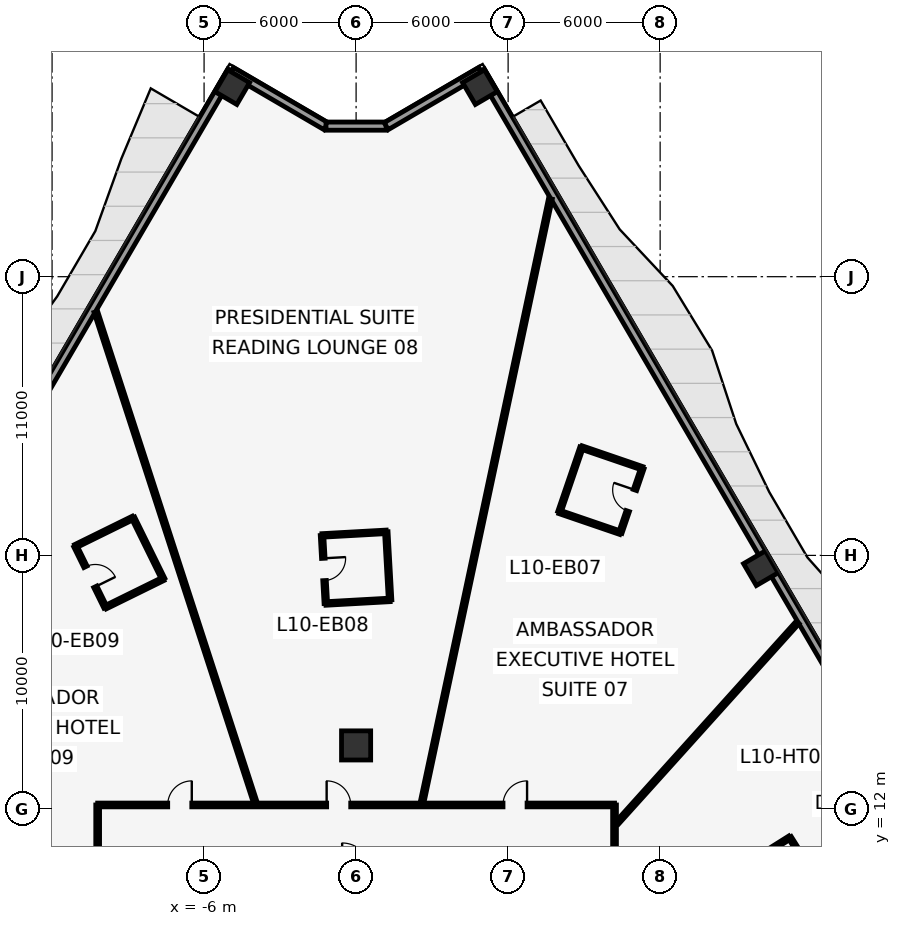
"""IFC4 building model, lengths in metres.
Left out: names, types, materials, properties, quantities, classifications, styles, units other than length and angle.
Written with IfcOpenShell. Run it as: python <this file> out.ifc"""

import sys

from ifc_helpers import new_model, si_unit, direction, frame, frame_2d, origin, origin_2d, place, context, subcontext, project, spatial, rectangle, hollow_rectangle, extrude, element, fill, save


model = new_model("IFC4")
c1 = context("Model", 3, precision=1e-05, world=origin(), true_north=direction((0.0, 1.0)))
c2 = subcontext(c1, "Body", "Model", "MODEL_VIEW")
j1 = project(units=[si_unit("LENGTHUNIT", "METRE"), si_unit("PLANEANGLEUNIT", "RADIAN")], contexts=[c1])
p1 = place(None, origin())
s1 = spatial("IfcSite", under=j1, at=p1, CompositionType="ELEMENT")
p2 = place(p1, origin())
s2 = spatial("IfcBuilding", under=s1, at=p2, CompositionType="ELEMENT")
p3 = place(p2, frame((0.0, 0.0, 50.4)))
s3 = spatial("IfcBuildingStorey", under=s2, at=p3, CompositionType="ELEMENT", Elevation=50.4)
p4 = place(p3, frame((0.0, 14.5, 0.0), z_axis=(0.0, 0.0, 1.0), x_axis=(1.0, 0.0, 0.0)))
e1 = element("IfcColumn", 1, at=p4, inside=s3, PredefinedType="COLUMN", context=c2, shape_type="SweptSolid", body=[
    extrude(rectangle(XDim=1.15, YDim=1.15, at=origin_2d()), origin(), (0.0, 0.0, 1.0), 4.0),
])
for number, where, z_axis, x_axis in (
    (2, (-4.887, 40.481, 0.0), (0.0, 0.0, 1.0), (0.504, 0.863, 0.0)),
    (3, (15.976, 21.494, 0.0), (0.0, 0.0, 1.0), (-0.504, 0.863, 0.0)),
    (4, (4.887, 40.481, 0.0), (0.0, 0.0, 1.0), (-0.504, 0.863, 0.0)),
):
    element("IfcColumn", number, at=place(p3, frame(where, z_axis=z_axis, x_axis=x_axis)), inside=s3, PredefinedType="COLUMN", context=c2, shape_type="SweptSolid", body=[
        extrude(hollow_rectangle(XDim=1.0, YDim=1.0, WallThickness=0.06, at=origin_2d()), origin(), (0.0, 0.0, 1.0), 4.0),
    ])
p5 = place(p3, frame((4.923, 41.122, 0.0), z_axis=(0.0, 0.0, 1.0), x_axis=(0.504213113214, -0.863579258935, 0.0)))
e5 = element("IfcWall", 5, at=p5, inside=s3, PredefinedType="STANDARD", context=c2, shape_type="SweptSolid", body=[
    extrude(rectangle(XDim=67.041, YDim=0.32, at=frame_2d((33.521, 0.0))), origin(), (0.0, 0.0, 1.0), 3.75),
])
p6 = place(p5, frame((33.021, 0.0, 0.0)))
e6 = element("IfcOpeningElement", 6, at=p6, cuts=e5, PredefinedType="OPENING", context=c2, shape_type="SweptSolid", body=[
    extrude(rectangle(XDim=1.0, YDim=2.15, at=frame_2d((0.5, 1.075))), frame((0.0, 0.17, 0.0), z_axis=(0.0, -1.0, 0.0), x_axis=(1.0, 0.0, 0.0)), (0.0, 0.0, 1.0), 0.34),
])
p7 = place(p3, frame((-38.726, -16.773, 0.0), z_axis=(0.0, 0.0, 1.0), x_axis=(0.504213113214, 0.863579258935, 0.0)))
e7 = element("IfcWall", 7, at=p7, inside=s3, PredefinedType="STANDARD", context=c2, shape_type="SweptSolid", body=[
    extrude(rectangle(XDim=67.041, YDim=0.32, at=frame_2d((33.521, 0.0))), origin(), (0.0, 0.0, 1.0), 3.75),
])
p8 = place(p7, frame((33.021, 0.0, 0.0)))
e8 = element("IfcOpeningElement", 8, at=p8, cuts=e7, PredefinedType="OPENING", context=c2, shape_type="SweptSolid", body=[
    extrude(rectangle(XDim=1.0, YDim=2.15, at=frame_2d((0.5, 1.075))), frame((0.0, 0.17, 0.0), z_axis=(0.0, -1.0, 0.0), x_axis=(1.0, 0.0, 0.0)), (0.0, 0.0, 1.0), 0.34),
])
p9 = place(p3, frame((-4.923, 41.122, 0.0), z_axis=(0.0, 0.0, 1.0), x_axis=(0.863588414101, -0.50419743259, 0.0)))
e9 = element("IfcWall", 9, at=p9, inside=s3, PredefinedType="STANDARD", context=c2, shape_type="SweptSolid", body=[
    extrude(rectangle(XDim=4.324, YDim=0.32, at=frame_2d((2.162, 0.0))), origin(), (0.0, 0.0, 1.0), 3.75),
])
p10 = place(p3, frame((-1.188, 38.941, 0.0), z_axis=(0.0, 0.0, 1.0), x_axis=(1.0, 0.0, 0.0)))
e10 = element("IfcWall", 10, at=p10, inside=s3, PredefinedType="STANDARD", context=c2, shape_type="SweptSolid", body=[
    extrude(rectangle(XDim=2.376, YDim=0.32, at=frame_2d((1.188, 0.0))), origin(), (0.0, 0.0, 1.0), 3.75),
])
p11 = place(p3, frame((1.188, 38.941, 0.0), z_axis=(0.0, 0.0, 1.0), x_axis=(0.863588414101, 0.50419743259, 0.0)))
e11 = element("IfcWall", 11, at=p11, inside=s3, PredefinedType="STANDARD", context=c2, shape_type="SweptSolid", body=[
    extrude(rectangle(XDim=4.324, YDim=0.32, at=frame_2d((2.162, 0.0))), origin(), (0.0, 0.0, 1.0), 3.75),
])
p12 = place(p3, frame((-10.2, 12.15, 0.0), z_axis=(0.0, 0.0, 1.0), x_axis=(1.0, 0.0, 0.0)))
e12 = element("IfcWall", 12, at=p12, inside=s3, PredefinedType="PARTITIONING", context=c2, shape_type="SweptSolid", body=[
    extrude(rectangle(XDim=20.4, YDim=0.15, at=frame_2d((10.2, 0.0))), origin(), (0.0, 0.0, 1.0), 3.75),
])
p13 = place(p12, frame((15.998, 0.0, 0.0)))
e13 = element("IfcOpeningElement", 13, at=p13, cuts=e12, PredefinedType="OPENING", context=c2, shape_type="SweptSolid", body=[
    extrude(rectangle(XDim=0.95, YDim=2.15, at=frame_2d((0.475, 1.075))), frame((0.0, 0.085, 0.0), z_axis=(0.0, -1.0, 0.0), x_axis=(1.0, 0.0, 0.0)), (0.0, 0.0, 1.0), 0.17),
])
p14 = place(p12, frame((9.038, 0.0, 0.0)))
e14 = element("IfcOpeningElement", 14, at=p14, cuts=e12, PredefinedType="OPENING", context=c2, shape_type="SweptSolid", body=[
    extrude(rectangle(XDim=0.95, YDim=2.15, at=frame_2d((0.475, 1.075))), frame((0.0, 0.085, 0.0), z_axis=(0.0, -1.0, 0.0), x_axis=(1.0, 0.0, 0.0)), (0.0, 0.0, 1.0), 0.17),
])
p15 = place(p12, frame((2.764, 0.0, 0.0)))
e15 = element("IfcOpeningElement", 15, at=p15, cuts=e12, PredefinedType="OPENING", context=c2, shape_type="SweptSolid", body=[
    extrude(rectangle(XDim=0.95, YDim=2.15, at=frame_2d((0.475, 1.075))), frame((0.0, 0.085, 0.0), z_axis=(0.0, -1.0, 0.0), x_axis=(1.0, 0.0, 0.0)), (0.0, 0.0, 1.0), 0.17),
])
p16 = place(p3, frame((10.2, 12.15, 0.0), z_axis=(0.0, 0.0, 1.0), x_axis=(0.0, -1.0, 0.0)))
e16 = element("IfcWall", 16, at=p16, inside=s3, PredefinedType="PARTITIONING", context=c2, shape_type="SweptSolid", body=[
    extrude(rectangle(XDim=24.0, YDim=0.15, at=frame_2d((12.0, 0.0))), origin(), (0.0, 0.0, 1.0), 3.75),
])
p17 = place(p16, frame((18.691, 0.0, 0.0)))
e17 = element("IfcOpeningElement", 17, at=p17, cuts=e16, PredefinedType="OPENING", context=c2, shape_type="SweptSolid", body=[
    extrude(rectangle(XDim=0.95, YDim=2.15, at=frame_2d((0.475, 1.075))), frame((0.0, 0.085, 0.0), z_axis=(0.0, -1.0, 0.0), x_axis=(1.0, 0.0, 0.0)), (0.0, 0.0, 1.0), 0.17),
])
p18 = place(p16, frame((11.086, 0.0, 0.0)))
e18 = element("IfcOpeningElement", 18, at=p18, cuts=e16, PredefinedType="OPENING", context=c2, shape_type="SweptSolid", body=[
    extrude(rectangle(XDim=0.95, YDim=2.15, at=frame_2d((0.475, 1.075))), frame((0.0, 0.085, 0.0), z_axis=(0.0, -1.0, 0.0), x_axis=(1.0, 0.0, 0.0)), (0.0, 0.0, 1.0), 0.17),
])
p19 = place(p16, frame((4.068, 0.0, 0.0)))
e19 = element("IfcOpeningElement", 19, at=p19, cuts=e16, PredefinedType="OPENING", context=c2, shape_type="SweptSolid", body=[
    extrude(rectangle(XDim=0.95, YDim=2.15, at=frame_2d((0.475, 1.075))), frame((0.0, 0.085, 0.0), z_axis=(0.0, -1.0, 0.0), x_axis=(1.0, 0.0, 0.0)), (0.0, 0.0, 1.0), 0.17),
])
p20 = place(p3, frame((-10.2, -11.85, 0.0), z_axis=(0.0, 0.0, 1.0), x_axis=(0.0, 1.0, 0.0)))
e20 = element("IfcWall", 20, at=p20, inside=s3, PredefinedType="PARTITIONING", context=c2, shape_type="SweptSolid", body=[
    extrude(rectangle(XDim=24.0, YDim=0.15, at=frame_2d((12.0, 0.0))), origin(), (0.0, 0.0, 1.0), 3.75),
])
p21 = place(p20, frame((8.765, 0.0, 0.0)))
e21 = element("IfcOpeningElement", 21, at=p21, cuts=e20, PredefinedType="OPENING", context=c2, shape_type="SweptSolid", body=[
    extrude(rectangle(XDim=0.95, YDim=2.15, at=frame_2d((0.475, 1.075))), frame((0.0, 0.085, 0.0), z_axis=(0.0, -1.0, 0.0), x_axis=(1.0, 0.0, 0.0)), (0.0, 0.0, 1.0), 0.17),
])
p22 = place(p20, frame((2.604, 0.0, 0.0)))
e22 = element("IfcOpeningElement", 22, at=p22, cuts=e20, PredefinedType="OPENING", context=c2, shape_type="SweptSolid", body=[
    extrude(rectangle(XDim=0.95, YDim=2.15, at=frame_2d((0.475, 1.075))), frame((0.0, 0.085, 0.0), z_axis=(0.0, -1.0, 0.0), x_axis=(1.0, 0.0, 0.0)), (0.0, 0.0, 1.0), 0.17),
])
p23 = place(p20, frame((15.759, 0.0, 0.0)))
e23 = element("IfcOpeningElement", 23, at=p23, cuts=e20, PredefinedType="OPENING", context=c2, shape_type="SweptSolid", body=[
    extrude(rectangle(XDim=0.95, YDim=2.15, at=frame_2d((0.475, 1.075))), frame((0.0, 0.085, 0.0), z_axis=(0.0, -1.0, 0.0), x_axis=(1.0, 0.0, 0.0)), (0.0, 0.0, 1.0), 0.17),
])
p24 = place(p3, frame((10.305, 11.445, 0.0), z_axis=(0.0, 0.0, 1.0), x_axis=(0.6691357603, 0.743140184815, 0.0)))
e24 = element("IfcWall", 24, at=p24, inside=s3, PredefinedType="PARTITIONING", context=c2, shape_type="SweptSolid", body=[
    extrude(rectangle(XDim=10.646, YDim=0.15, at=frame_2d((5.323, 0.0))), origin(), (0.0, 0.0, 1.0), 3.75),
])
p25 = place(p3, frame((2.605, 12.255, 0.0), z_axis=(0.0, 0.0, 1.0), x_axis=(0.207909477675, 0.978148071149, 0.0)))
e25 = element("IfcWall", 25, at=p25, inside=s3, PredefinedType="PARTITIONING", context=c2, shape_type="SweptSolid", body=[
    extrude(rectangle(XDim=24.351, YDim=0.15, at=frame_2d((12.175, 0.0))), origin(), (0.0, 0.0, 1.0), 3.75),
])
p26 = place(p3, frame((-3.982, 12.255, 0.0), z_axis=(0.0, 0.0, 1.0), x_axis=(-0.309011216684, 0.951058393561, 0.0)))
e26 = element("IfcWall", 26, at=p26, inside=s3, PredefinedType="PARTITIONING", context=c2, shape_type="SweptSolid", body=[
    extrude(rectangle(XDim=20.354, YDim=0.15, at=frame_2d((10.177, 0.0))), origin(), (0.0, 0.0, 1.0), 3.75),
])
p27 = place(p3, frame((-10.305, 8.051, 0.0), z_axis=(0.0, 0.0, 1.0), x_axis=(-0.788008281042, 0.615664640051, 0.0)))
e27 = element("IfcWall", 27, at=p27, inside=s3, PredefinedType="PARTITIONING", context=c2, shape_type="SweptSolid", body=[
    extrude(rectangle(XDim=11.96, YDim=0.15, at=frame_2d((5.98, 0.0))), origin(), (0.0, 0.0, 1.0), 3.75),
])
p28 = place(p3, frame((18.469, 8.717, 0.0), z_axis=(0.0, 0.0, 1.0), x_axis=(-0.53290759563, 0.846173442339, 0.0)))
e28 = element("IfcWall", 28, at=p28, inside=s3, PredefinedType="PARTITIONING", context=c2, shape_type="SweptSolid", body=[
    extrude(rectangle(XDim=2.54, YDim=0.14, at=frame_2d((1.27, 0.0))), origin(), (0.0, 0.0, 1.0), 3.75),
])
p29 = place(p3, frame((17.115, 10.866, 0.0), z_axis=(0.0, 0.0, 1.0), x_axis=(-0.846193429407, -0.532875857991, 0.0)))
e29 = element("IfcWall", 29, at=p29, inside=s3, PredefinedType="PARTITIONING", context=c2, shape_type="SweptSolid", body=[
    extrude(rectangle(XDim=2.69, YDim=0.14, at=frame_2d((1.345, 0.0))), origin(), (0.0, 0.0, 1.0), 3.75),
])
p30 = place(p29, frame((0.905, 0.0, 0.0)))
e30 = element("IfcOpeningElement", 30, at=p30, cuts=e29, PredefinedType="OPENING", context=c2, shape_type="SweptSolid", body=[
    extrude(rectangle(XDim=0.88, YDim=2.1, at=frame_2d((0.44, 1.05))), frame((0.0, 0.08, 0.0), z_axis=(0.0, -1.0, 0.0), x_axis=(1.0, 0.0, 0.0)), (0.0, 0.0, 1.0), 0.16),
])
p31 = place(p3, frame((10.428, 22.893, 0.0), z_axis=(0.0, 0.0, 1.0), x_axis=(0.323922868878, 0.946083492625, 0.0)))
e31 = element("IfcWall", 31, at=p31, inside=s3, PredefinedType="PARTITIONING", context=c2, shape_type="SweptSolid", body=[
    extrude(rectangle(XDim=2.69, YDim=0.14, at=frame_2d((1.345, 0.0))), origin(), (0.0, 0.0, 1.0), 3.75),
])
p32 = place(p31, frame((0.905, 0.0, 0.0)))
e32 = element("IfcOpeningElement", 32, at=p32, cuts=e31, PredefinedType="OPENING", context=c2, shape_type="SweptSolid", body=[
    extrude(rectangle(XDim=0.88, YDim=2.1, at=frame_2d((0.44, 1.05))), frame((0.0, 0.08, 0.0), z_axis=(0.0, -1.0, 0.0), x_axis=(1.0, 0.0, 0.0)), (0.0, 0.0, 1.0), 0.16),
])
p33 = place(p3, frame((11.3, 25.438, 0.0), z_axis=(0.0, 0.0, 1.0), x_axis=(-0.946085716499, 0.323916373524, 0.0)))
e33 = element("IfcWall", 33, at=p33, inside=s3, PredefinedType="PARTITIONING", context=c2, shape_type="SweptSolid", body=[
    extrude(rectangle(XDim=2.54, YDim=0.14, at=frame_2d((1.27, 0.0))), origin(), (0.0, 0.0, 1.0), 3.75),
])
p34 = place(p3, frame((8.896, 26.26, 0.0), z_axis=(0.0, 0.0, 1.0), x_axis=(-0.323922868878, -0.946083492625, 0.0)))
e34 = element("IfcWall", 34, at=p34, inside=s3, PredefinedType="PARTITIONING", context=c2, shape_type="SweptSolid", body=[
    extrude(rectangle(XDim=2.69, YDim=0.14, at=frame_2d((1.345, 0.0))), origin(), (0.0, 0.0, 1.0), 3.75),
])
p35 = place(p3, frame((8.025, 23.715, 0.0), z_axis=(0.0, 0.0, 1.0), x_axis=(0.946085716499, -0.323916373524, 0.0)))
e35 = element("IfcWall", 35, at=p35, inside=s3, PredefinedType="PARTITIONING", context=c2, shape_type="SweptSolid", body=[
    extrude(rectangle(XDim=2.54, YDim=0.14, at=frame_2d((1.27, 0.0))), origin(), (0.0, 0.0, 1.0), 3.75),
])
p36 = place(p3, frame((1.342, 20.244, 0.0), z_axis=(0.0, 0.0, 1.0), x_axis=(-0.055816855724, 0.998441024106, 0.0)))
e36 = element("IfcWall", 36, at=p36, inside=s3, PredefinedType="PARTITIONING", context=c2, shape_type="SweptSolid", body=[
    extrude(rectangle(XDim=2.69, YDim=0.14, at=frame_2d((1.345, 0.0))), origin(), (0.0, 0.0, 1.0), 2.798),
])
p37 = place(p3, frame((1.191, 22.93, 0.0), z_axis=(0.0, 0.0, 1.0), x_axis=(-0.998439582043, -0.055842645087, 0.0)))
e37 = element("IfcWall", 37, at=p37, inside=s3, PredefinedType="PARTITIONING", context=c2, shape_type="SweptSolid", body=[
    extrude(rectangle(XDim=2.54, YDim=0.14, at=frame_2d((1.27, 0.0))), origin(), (0.0, 0.0, 1.0), 3.75),
])
p38 = place(p3, frame((-1.345, 22.788, 0.0), z_axis=(0.0, 0.0, 1.0), x_axis=(0.055816855724, -0.998441024106, 0.0)))
e38 = element("IfcWall", 38, at=p38, inside=s3, PredefinedType="PARTITIONING", context=c2, shape_type="SweptSolid", body=[
    extrude(rectangle(XDim=2.69, YDim=0.14, at=frame_2d((1.345, 0.0))), origin(), (0.0, 0.0, 1.0), 2.798),
])
p39 = place(p38, frame((0.905, 0.0, 0.0)))
e39 = element("IfcOpeningElement", 39, at=p39, cuts=e38, PredefinedType="OPENING", context=c2, shape_type="SweptSolid", body=[
    extrude(rectangle(XDim=0.88, YDim=2.1, at=frame_2d((0.44, 1.05))), frame((0.0, 0.08, 0.0), z_axis=(0.0, -1.0, 0.0), x_axis=(1.0, 0.0, 0.0)), (0.0, 0.0, 1.0), 0.16),
])
p40 = place(p3, frame((-1.195, 20.102, 0.0), z_axis=(0.0, 0.0, 1.0), x_axis=(0.998439582043, 0.055842645087, 0.0)))
e40 = element("IfcWall", 40, at=p40, inside=s3, PredefinedType="PARTITIONING", context=c2, shape_type="SweptSolid", body=[
    extrude(rectangle(XDim=2.54, YDim=0.14, at=frame_2d((1.27, 0.0))), origin(), (0.0, 0.0, 1.0), 3.75),
])
p41 = place(p3, frame((-7.614, 21.071, 0.0), z_axis=(0.0, 0.0, 1.0), x_axis=(-0.441468216104, 0.89727688824, 0.0)))
e41 = element("IfcWall", 41, at=p41, inside=s3, PredefinedType="PARTITIONING", context=c2, shape_type="SweptSolid", body=[
    extrude(rectangle(XDim=2.69, YDim=0.14, at=frame_2d((1.345, 0.0))), origin(), (0.0, 0.0, 1.0), 3.75),
])
p42 = place(p3, frame((-8.802, 23.485, 0.0), z_axis=(0.0, 0.0, 1.0), x_axis=(-0.897291929889, -0.441437642886, 0.0)))
e42 = element("IfcWall", 42, at=p42, inside=s3, PredefinedType="PARTITIONING", context=c2, shape_type="SweptSolid", body=[
    extrude(rectangle(XDim=2.54, YDim=0.14, at=frame_2d((1.27, 0.0))), origin(), (0.0, 0.0, 1.0), 3.75),
])
p43 = place(p3, frame((-11.081, 22.363, 0.0), z_axis=(0.0, 0.0, 1.0), x_axis=(0.441541285032, -0.897240933982, 0.0)))
e43 = element("IfcWall", 43, at=p43, inside=s3, PredefinedType="PARTITIONING", context=c2, shape_type="SweptSolid", body=[
    extrude(rectangle(XDim=2.69, YDim=0.14, at=frame_2d((1.345, 0.0))), origin(), (0.0, 0.0, 1.0), 3.75),
])
p44 = place(p43, frame((0.905, 0.0, 0.0)))
e44 = element("IfcOpeningElement", 44, at=p44, cuts=e43, PredefinedType="OPENING", context=c2, shape_type="SweptSolid", body=[
    extrude(rectangle(XDim=0.88, YDim=2.1, at=frame_2d((0.44, 1.05))), frame((0.0, 0.08, 0.0), z_axis=(0.0, -1.0, 0.0), x_axis=(1.0, 0.0, 0.0)), (0.0, 0.0, 1.0), 0.16),
])
p45 = place(p3, frame((-9.893, 19.95, 0.0), z_axis=(0.0, 0.0, 1.0), x_axis=(0.897273198593, 0.441475715173, 0.0)))
e45 = element("IfcWall", 45, at=p45, inside=s3, PredefinedType="PARTITIONING", context=c2, shape_type="SweptSolid", body=[
    extrude(rectangle(XDim=2.54, YDim=0.14, at=frame_2d((1.27, 0.0))), origin(), (0.0, 0.0, 1.0), 3.75),
])
p46 = place(p32, origin())
e46 = element("IfcDoor", 46, at=p46, inside=s3, OperationType="SINGLE_SWING_RIGHT", PredefinedType="DOOR", context=c2, shape_type="SweptSolid", body=[
    extrude(rectangle(XDim=0.88, YDim=2.1, at=frame_2d((0.44, 1.05))), frame((0.0, 0.025, 0.0), z_axis=(0.0, -1.0, 0.0), x_axis=(1.0, 0.0, 0.0)), (0.0, 0.0, 1.0), 0.05),
])
fill(e32, e46)
p47 = place(p39, origin())
e47 = element("IfcDoor", 47, at=p47, inside=s3, OperationType="SINGLE_SWING_LEFT", PredefinedType="DOOR", context=c2, shape_type="SweptSolid", body=[
    extrude(rectangle(XDim=0.88, YDim=2.1, at=frame_2d((0.44, 1.05))), frame((0.0, 0.025, 0.0), z_axis=(0.0, -1.0, 0.0), x_axis=(1.0, 0.0, 0.0)), (0.0, 0.0, 1.0), 0.05),
])
fill(e39, e47)
p48 = place(p44, origin())
e48 = element("IfcDoor", 48, at=p48, inside=s3, OperationType="SINGLE_SWING_RIGHT", PredefinedType="DOOR", context=c2, shape_type="SweptSolid", body=[
    extrude(rectangle(XDim=0.88, YDim=2.1, at=frame_2d((0.44, 1.05))), frame((0.0, 0.025, 0.0), z_axis=(0.0, -1.0, 0.0), x_axis=(1.0, 0.0, 0.0)), (0.0, 0.0, 1.0), 0.05),
])
fill(e44, e48)
p49 = place(p13, origin())
e49 = element("IfcDoor", 49, at=p49, inside=s3, OperationType="SINGLE_SWING_RIGHT", PredefinedType="DOOR", context=c2, shape_type="SweptSolid", body=[
    extrude(rectangle(XDim=0.95, YDim=2.15, at=frame_2d((0.475, 1.075))), frame((0.0, 0.025, 0.0), z_axis=(0.0, -1.0, 0.0), x_axis=(1.0, 0.0, 0.0)), (0.0, 0.0, 1.0), 0.05),
])
fill(e13, e49)
p50 = place(p14, origin())
e50 = element("IfcDoor", 50, at=p50, inside=s3, OperationType="SINGLE_SWING_LEFT", PredefinedType="DOOR", context=c2, shape_type="SweptSolid", body=[
    extrude(rectangle(XDim=0.95, YDim=2.15, at=frame_2d((0.475, 1.075))), frame((0.0, 0.025, 0.0), z_axis=(0.0, -1.0, 0.0), x_axis=(1.0, 0.0, 0.0)), (0.0, 0.0, 1.0), 0.05),
])
fill(e14, e50)
p51 = place(p15, origin())
e51 = element("IfcDoor", 51, at=p51, inside=s3, OperationType="SINGLE_SWING_RIGHT", PredefinedType="DOOR", context=c2, shape_type="SweptSolid", body=[
    extrude(rectangle(XDim=0.95, YDim=2.15, at=frame_2d((0.475, 1.075))), frame((0.0, 0.025, 0.0), z_axis=(0.0, -1.0, 0.0), x_axis=(1.0, 0.0, 0.0)), (0.0, 0.0, 1.0), 0.05),
])
fill(e15, e51)
save(model, sys.argv[1])
